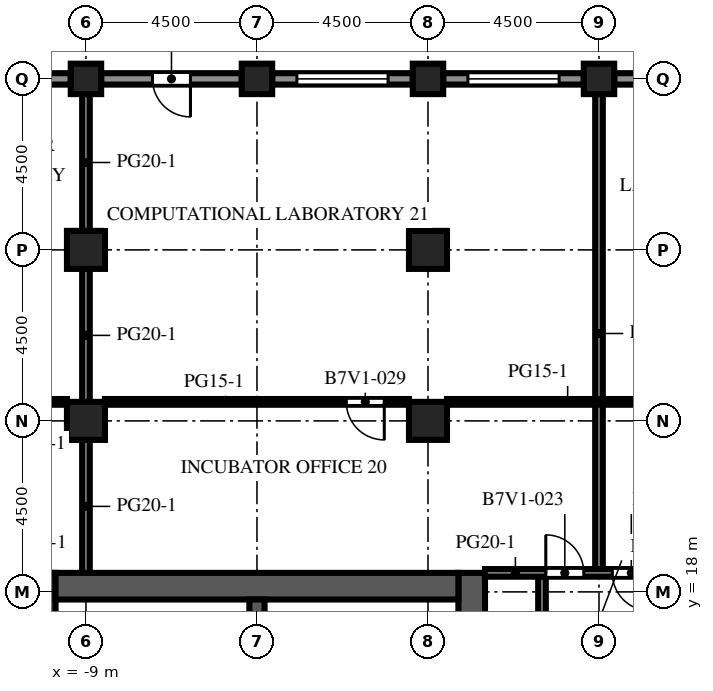
"""IFC4 building model, lengths in metres.
Left out: names, types, materials, properties, quantities, classifications, styles, units other than length and angle.
Written with IfcOpenShell. Run it as: python <this file> out.ifc"""

import sys

from ifc_helpers import new_model, si_unit, direction, frame, frame_2d, origin, origin_2d, place, context, subcontext, project, spatial, rectangle, extrude, element, fill, save


model = new_model("IFC4")
c1 = context("Model", 3, precision=1e-05, world=origin(), true_north=direction((0.0, 1.0)))
c2 = subcontext(c1, "Body", "Model", "MODEL_VIEW")
j1 = project(units=[si_unit("LENGTHUNIT", "METRE"), si_unit("PLANEANGLEUNIT", "RADIAN")], contexts=[c1])
p1 = place(None, origin())
s1 = spatial("IfcSite", under=j1, at=p1, CompositionType="ELEMENT")
p2 = place(p1, origin())
s2 = spatial("IfcBuilding", under=s1, at=p2, CompositionType="ELEMENT")
p3 = place(p2, frame((0.0, 0.0, 243.9)))
s3 = spatial("IfcBuildingStorey", under=s2, at=p3, CompositionType="ELEMENT", Elevation=243.9)
for number, where, z_axis, x_axis in (
    (1, (-9.0, 31.5, 0.0), (0.0, 0.0, 1.0), (1.0, 0.0, 0.0)),
    (2, (-4.5, 31.5, 0.0), (0.0, 0.0, 1.0), (1.0, 0.0, 0.0)),
    (3, (0.0, 31.5, 0.0), (0.0, 0.0, 1.0), (1.0, 0.0, 0.0)),
    (4, (4.5, 31.5, 0.0), (0.0, 0.0, 1.0), (1.0, 0.0, 0.0)),
):
    element("IfcColumn", number, at=place(p3, frame(where, z_axis=z_axis, x_axis=x_axis)), inside=s3, PredefinedType="COLUMN", context=c2, shape_type="SweptSolid", body=[
        extrude(rectangle(XDim=0.8, YDim=0.8, at=origin_2d()), origin(), (0.0, 0.0, 1.0), 4.1),
    ])
for number, where, z_axis, x_axis in (
    (5, (-9.0, 22.5, 0.0), (0.0, 0.0, 1.0), (1.0, 0.0, 0.0)),
    (6, (-9.0, 27.0, 0.0), (0.0, 0.0, 1.0), (1.0, 0.0, 0.0)),
    (7, (0.0, 22.5, 0.0), (0.0, 0.0, 1.0), (1.0, 0.0, 0.0)),
    (8, (0.0, 27.0, 0.0), (0.0, 0.0, 1.0), (1.0, 0.0, 0.0)),
):
    element("IfcColumn", number, at=place(p3, frame(where, z_axis=z_axis, x_axis=x_axis)), inside=s3, PredefinedType="COLUMN", context=c2, shape_type="SweptSolid", body=[
        extrude(rectangle(XDim=1.0, YDim=1.0, at=origin_2d()), origin(), (0.0, 0.0, 1.0), 4.1),
    ])
p4 = place(p3, frame((-10.15, -9.0, 0.0), z_axis=(0.0, 0.0, 1.0), x_axis=(0.0, 1.0, 0.0)))
e9 = element("IfcWall", 9, at=p4, inside=s3, PredefinedType="SHEAR", context=c2, shape_type="SweptSolid", body=[
    extrude(rectangle(XDim=27.5, YDim=0.7, at=frame_2d((13.75, 0.0))), origin(), (0.0, 0.0, 1.0), 4.1),
])
p5 = place(p4, frame((12.55, 0.0, 0.0)))
e10 = element("IfcOpeningElement", 10, at=p5, cuts=e9, PredefinedType="OPENING", context=c2, shape_type="SweptSolid", body=[
    extrude(rectangle(XDim=2.4, YDim=2.4, at=frame_2d((1.2, 1.2))), frame((0.0, 0.36, 0.0), z_axis=(0.0, -1.0, 0.0), x_axis=(1.0, 0.0, 0.0)), (0.0, 0.0, 1.0), 0.72),
])
p6 = place(p4, frame((6.825, 0.0, 0.0)))
e11 = element("IfcOpeningElement", 11, at=p6, cuts=e9, PredefinedType="OPENING", context=c2, shape_type="SweptSolid", body=[
    extrude(rectangle(XDim=1.2, YDim=2.1, at=frame_2d((0.6, 1.05))), frame((0.0, 0.36, 0.0), z_axis=(0.0, -1.0, 0.0), x_axis=(1.0, 0.0, 0.0)), (0.0, 0.0, 1.0), 0.72),
])
p7 = place(p4, frame((19.475, 0.0, 0.0)))
e12 = element("IfcOpeningElement", 12, at=p7, cuts=e9, PredefinedType="OPENING", context=c2, shape_type="SweptSolid", body=[
    extrude(rectangle(XDim=1.2, YDim=2.1, at=frame_2d((0.6, 1.05))), frame((0.0, 0.36, 0.0), z_axis=(0.0, -1.0, 0.0), x_axis=(1.0, 0.0, 0.0)), (0.0, 0.0, 1.0), 0.72),
])
p8 = place(p3, frame((1.15, -9.0, 0.0), z_axis=(0.0, 0.0, 1.0), x_axis=(0.0, 1.0, 0.0)))
e13 = element("IfcWall", 13, at=p8, inside=s3, PredefinedType="SHEAR", context=c2, shape_type="SweptSolid", body=[
    extrude(rectangle(XDim=27.5, YDim=0.7, at=frame_2d((13.75, 0.0))), origin(), (0.0, 0.0, 1.0), 4.1),
])
p9 = place(p8, frame((12.55, 0.0, 0.0)))
e14 = element("IfcOpeningElement", 14, at=p9, cuts=e13, PredefinedType="OPENING", context=c2, shape_type="SweptSolid", body=[
    extrude(rectangle(XDim=2.4, YDim=2.4, at=frame_2d((1.2, 1.2))), frame((0.0, 0.36, 0.0), z_axis=(0.0, -1.0, 0.0), x_axis=(1.0, 0.0, 0.0)), (0.0, 0.0, 1.0), 0.72),
])
p10 = place(p8, frame((3.9, 0.0, 0.0)))
e15 = element("IfcOpeningElement", 15, at=p10, cuts=e13, PredefinedType="OPENING", context=c2, shape_type="SweptSolid", body=[
    extrude(rectangle(XDim=1.2, YDim=2.1, at=frame_2d((0.6, 1.05))), frame((0.0, 0.36, 0.0), z_axis=(0.0, -1.0, 0.0), x_axis=(1.0, 0.0, 0.0)), (0.0, 0.0, 1.0), 0.72),
])
p11 = place(p8, frame((22.4, 0.0, 0.0)))
e16 = element("IfcOpeningElement", 16, at=p11, cuts=e13, PredefinedType="OPENING", context=c2, shape_type="SweptSolid", body=[
    extrude(rectangle(XDim=1.2, YDim=2.1, at=frame_2d((0.6, 1.05))), frame((0.0, 0.36, 0.0), z_axis=(0.0, -1.0, 0.0), x_axis=(1.0, 0.0, 0.0)), (0.0, 0.0, 1.0), 0.72),
])
p12 = place(p3, frame((-9.8, 18.15, 0.0), z_axis=(0.0, 0.0, 1.0), x_axis=(1.0, 0.0, 0.0)))
e17 = element("IfcWall", 17, at=p12, inside=s3, PredefinedType="SHEAR", context=c2, shape_type="SweptSolid", body=[
    extrude(rectangle(XDim=10.6, YDim=0.7, at=frame_2d((5.3, 0.0))), origin(), (0.0, 0.0, 1.0), 4.1),
])
p13 = place(p3, frame((-4.5, 10.2, 0.0), z_axis=(0.0, 0.0, 1.0), x_axis=(0.0, 1.0, 0.0)))
e18 = element("IfcWall", 18, at=p13, inside=s3, PredefinedType="SHEAR", context=c2, shape_type="SweptSolid", body=[
    extrude(rectangle(XDim=7.6, YDim=0.4, at=frame_2d((3.8, 0.0))), origin(), (0.0, 0.0, 1.0), 4.1),
])
p14 = place(p3, frame((4.9, 31.5, 0.0), z_axis=(0.0, 0.0, 1.0), x_axis=(1.0, 0.0, 0.0)))
e19 = element("IfcWall", 19, at=p14, inside=s3, PredefinedType="SOLIDWALL", context=c2, shape_type="SweptSolid", body=[
    extrude(rectangle(XDim=3.7, YDim=0.3, at=frame_2d((1.85, 0.0))), origin(), (0.0, 0.0, 1.0), 2.85),
])
p15 = place(p14, frame((0.65, 0.0, 0.8)))
e20 = element("IfcOpeningElement", 20, at=p15, cuts=e19, PredefinedType="OPENING", context=c2, shape_type="SweptSolid", body=[
    extrude(rectangle(XDim=2.4, YDim=1.7, at=frame_2d((1.2, 0.85))), frame((0.0, 0.16, 0.0), z_axis=(0.0, -1.0, 0.0), x_axis=(1.0, 0.0, 0.0)), (0.0, 0.0, 1.0), 0.32),
])
p16 = place(p3, frame((0.4, 31.5, 0.0), z_axis=(0.0, 0.0, 1.0), x_axis=(1.0, 0.0, 0.0)))
e21 = element("IfcWall", 21, at=p16, inside=s3, PredefinedType="SOLIDWALL", context=c2, shape_type="SweptSolid", body=[
    extrude(rectangle(XDim=3.7, YDim=0.3, at=frame_2d((1.85, 0.0))), origin(), (0.0, 0.0, 1.0), 2.85),
])
p17 = place(p16, frame((0.65, 0.0, 0.8)))
e22 = element("IfcOpeningElement", 22, at=p17, cuts=e21, PredefinedType="OPENING", context=c2, shape_type="SweptSolid", body=[
    extrude(rectangle(XDim=2.4, YDim=1.7, at=frame_2d((1.2, 0.85))), frame((0.0, 0.16, 0.0), z_axis=(0.0, -1.0, 0.0), x_axis=(1.0, 0.0, 0.0)), (0.0, 0.0, 1.0), 0.32),
])
p18 = place(p3, frame((-4.1, 31.5, 0.0), z_axis=(0.0, 0.0, 1.0), x_axis=(1.0, 0.0, 0.0)))
e23 = element("IfcWall", 23, at=p18, inside=s3, PredefinedType="SOLIDWALL", context=c2, shape_type="SweptSolid", body=[
    extrude(rectangle(XDim=3.7, YDim=0.3, at=frame_2d((1.85, 0.0))), origin(), (0.0, 0.0, 1.0), 2.85),
])
p19 = place(p18, frame((0.65, 0.0, 0.8)))
e24 = element("IfcOpeningElement", 24, at=p19, cuts=e23, PredefinedType="OPENING", context=c2, shape_type="SweptSolid", body=[
    extrude(rectangle(XDim=2.4, YDim=1.7, at=frame_2d((1.2, 0.85))), frame((0.0, 0.16, 0.0), z_axis=(0.0, -1.0, 0.0), x_axis=(1.0, 0.0, 0.0)), (0.0, 0.0, 1.0), 0.32),
])
p20 = place(p3, frame((-8.6, 31.5, 0.0), z_axis=(0.0, 0.0, 1.0), x_axis=(1.0, 0.0, 0.0)))
e25 = element("IfcWall", 25, at=p20, inside=s3, PredefinedType="SOLIDWALL", context=c2, shape_type="SweptSolid", body=[
    extrude(rectangle(XDim=3.7, YDim=0.3, at=frame_2d((1.85, 0.0))), origin(), (0.0, 0.0, 1.0), 2.85),
])
p21 = place(p20, frame((1.35, 0.0, 0.0)))
e26 = element("IfcOpeningElement", 26, at=p21, cuts=e25, PredefinedType="OPENING", context=c2, shape_type="SweptSolid", body=[
    extrude(rectangle(XDim=1.0, YDim=2.2, at=frame_2d((0.5, 1.1))), frame((0.0, 0.16, 0.0), z_axis=(0.0, -1.0, 0.0), x_axis=(1.0, 0.0, 0.0)), (0.0, 0.0, 1.0), 0.32),
])
p22 = place(p3, frame((-13.1, 31.5, 0.0), z_axis=(0.0, 0.0, 1.0), x_axis=(1.0, 0.0, 0.0)))
e27 = element("IfcWall", 27, at=p22, inside=s3, PredefinedType="SOLIDWALL", context=c2, shape_type="SweptSolid", body=[
    extrude(rectangle(XDim=3.7, YDim=0.3, at=frame_2d((1.85, 0.0))), origin(), (0.0, 0.0, 1.0), 2.85),
])
p23 = place(p22, frame((0.65, 0.0, 0.8)))
e28 = element("IfcOpeningElement", 28, at=p23, cuts=e27, PredefinedType="OPENING", context=c2, shape_type="SweptSolid", body=[
    extrude(rectangle(XDim=2.4, YDim=1.7, at=frame_2d((1.2, 0.85))), frame((0.0, 0.16, 0.0), z_axis=(0.0, -1.0, 0.0), x_axis=(1.0, 0.0, 0.0)), (0.0, 0.0, 1.0), 0.32),
])
p24 = place(p3, frame((-0.6, 14.912, 0.0), z_axis=(0.0, 0.0, 1.0), x_axis=(0.0, 1.0, 0.0)))
e29 = element("IfcWall", 29, at=p24, inside=s3, PredefinedType="PARTITIONING", context=c2, shape_type="SweptSolid", body=[
    extrude(rectangle(XDim=2.888, YDim=0.1, at=frame_2d((1.444, 0.0))), origin(), (0.0, 0.0, 1.0), 3.65),
])
p25 = place(p24, frame((0.944, 0.0, 0.0)))
e30 = element("IfcOpeningElement", 30, at=p25, cuts=e29, PredefinedType="OPENING", context=c2, shape_type="SweptSolid", body=[
    extrude(rectangle(XDim=1.0, YDim=2.1, at=frame_2d((0.5, 1.05))), frame((0.0, 0.06, 0.0), z_axis=(0.0, -1.0, 0.0), x_axis=(1.0, 0.0, 0.0)), (0.0, 0.0, 1.0), 0.12),
])
for number, where, z_axis, x_axis in (
    (31, (-9.0, 18.5, 0.0), (0.0, 0.0, 1.0), (0.0, 1.0, 0.0)),
    (32, (-9.0, 23.0, 0.0), (0.0, 0.0, 1.0), (0.0, 1.0, 0.0)),
):
    element("IfcWall", number, at=place(p3, frame(where, z_axis=z_axis, x_axis=x_axis)), inside=s3, PredefinedType="PARTITIONING", context=c2, shape_type="SweptSolid", body=[
        extrude(rectangle(XDim=3.5, YDim=0.2, at=frame_2d((1.75, 0.0))), origin(), (0.0, 0.0, 1.0), 3.65),
    ])
p26 = place(p3, frame((-9.0, 27.5, 0.0), z_axis=(0.0, 0.0, 1.0), x_axis=(0.0, 1.0, 0.0)))
e33 = element("IfcWall", 33, at=p26, inside=s3, PredefinedType="PARTITIONING", context=c2, shape_type="SweptSolid", body=[
    extrude(rectangle(XDim=3.6, YDim=0.2, at=frame_2d((1.8, 0.0))), origin(), (0.0, 0.0, 1.0), 3.65),
])
p27 = place(p3, frame((3.0, 6.7, 0.0), z_axis=(0.0, 0.0, 1.0), x_axis=(0.0, 1.0, 0.0)))
e34 = element("IfcWall", 34, at=p27, inside=s3, PredefinedType="PARTITIONING", context=c2, shape_type="SweptSolid", body=[
    extrude(rectangle(XDim=11.8, YDim=0.2, at=frame_2d((5.9, 0.0))), origin(), (0.0, 0.0, 1.0), 3.65),
])
p28 = place(p27, frame((6.1, 0.0, 0.0)))
e35 = element("IfcOpeningElement", 35, at=p28, cuts=e34, PredefinedType="OPENING", context=c2, shape_type="SweptSolid", body=[
    extrude(rectangle(XDim=1.0, YDim=2.1, at=frame_2d((0.5, 1.05))), frame((0.0, 0.11, 0.0), z_axis=(0.0, -1.0, 0.0), x_axis=(1.0, 0.0, 0.0)), (0.0, 0.0, 1.0), 0.22),
])
p29 = place(p3, frame((4.5, 18.5, 0.0), z_axis=(0.0, 0.0, 1.0), x_axis=(0.0, 1.0, 0.0)))
e36 = element("IfcWall", 36, at=p29, inside=s3, PredefinedType="PARTITIONING", context=c2, shape_type="SweptSolid", body=[
    extrude(rectangle(XDim=12.6, YDim=0.2, at=frame_2d((6.3, 0.0))), origin(), (0.0, 0.0, 1.0), 3.65),
])
p30 = place(p3, frame((1.5, 18.5, 0.0), z_axis=(0.0, 0.0, 1.0), x_axis=(1.0, 0.0, 0.0)))
e37 = element("IfcWall", 37, at=p30, inside=s3, PredefinedType="PARTITIONING", context=c2, shape_type="SweptSolid", body=[
    extrude(rectangle(XDim=4.5, YDim=0.2, at=frame_2d((2.25, 0.0))), origin(), (0.0, 0.0, 1.0), 3.65),
])
p31 = place(p30, frame((1.6, 0.0, 0.0)))
e38 = element("IfcOpeningElement", 38, at=p31, cuts=e37, PredefinedType="OPENING", context=c2, shape_type="SweptSolid", body=[
    extrude(rectangle(XDim=1.0, YDim=2.1, at=frame_2d((0.5, 1.05))), frame((0.0, 0.11, 0.0), z_axis=(0.0, -1.0, 0.0), x_axis=(1.0, 0.0, 0.0)), (0.0, 0.0, 1.0), 0.22),
])
p32 = place(p30, frame((3.35, 0.0, 0.0)))
e39 = element("IfcOpeningElement", 39, at=p32, cuts=e37, PredefinedType="OPENING", context=c2, shape_type="SweptSolid", body=[
    extrude(rectangle(XDim=1.0, YDim=2.1, at=frame_2d((0.5, 1.05))), frame((0.0, 0.11, 0.0), z_axis=(0.0, -1.0, 0.0), x_axis=(1.0, 0.0, 0.0)), (0.0, 0.0, 1.0), 0.22),
])
p33 = place(p3, frame((-13.5, 23.0, 0.0), z_axis=(0.0, 0.0, 1.0), x_axis=(1.0, 0.0, 0.0)))
e40 = element("IfcWall", 40, at=p33, inside=s3, PredefinedType="PARTITIONING", context=c2, shape_type="SweptSolid", body=[
    extrude(rectangle(XDim=4.0, YDim=0.15, at=frame_2d((2.0, 0.0))), origin(), (0.0, 0.0, 1.0), 3.65),
])
p34 = place(p33, frame((1.35, 0.0, 0.0)))
e41 = element("IfcOpeningElement", 41, at=p34, cuts=e40, PredefinedType="OPENING", context=c2, shape_type="SweptSolid", body=[
    extrude(rectangle(XDim=1.0, YDim=2.1, at=frame_2d((0.5, 1.05))), frame((0.0, 0.085, 0.0), z_axis=(0.0, -1.0, 0.0), x_axis=(1.0, 0.0, 0.0)), (0.0, 0.0, 1.0), 0.17),
])
p35 = place(p3, frame((-8.5, 23.0, 0.0), z_axis=(0.0, 0.0, 1.0), x_axis=(1.0, 0.0, 0.0)))
e42 = element("IfcWall", 42, at=p35, inside=s3, PredefinedType="PARTITIONING", context=c2, shape_type="SweptSolid", body=[
    extrude(rectangle(XDim=8.0, YDim=0.15, at=frame_2d((4.0, 0.0))), origin(), (0.0, 0.0, 1.0), 3.65),
])
p36 = place(p35, frame((6.35, 0.0, 0.0)))
e43 = element("IfcOpeningElement", 43, at=p36, cuts=e42, PredefinedType="OPENING", context=c2, shape_type="SweptSolid", body=[
    extrude(rectangle(XDim=1.0, YDim=2.1, at=frame_2d((0.5, 1.05))), frame((0.0, 0.085, 0.0), z_axis=(0.0, -1.0, 0.0), x_axis=(1.0, 0.0, 0.0)), (0.0, 0.0, 1.0), 0.17),
])
p37 = place(p3, frame((0.5, 23.0, 0.0), z_axis=(0.0, 0.0, 1.0), x_axis=(1.0, 0.0, 0.0)))
e44 = element("IfcWall", 44, at=p37, inside=s3, PredefinedType="PARTITIONING", context=c2, shape_type="SweptSolid", body=[
    extrude(rectangle(XDim=8.0, YDim=0.15, at=frame_2d((4.0, 0.0))), origin(), (0.0, 0.0, 1.0), 3.65),
])
p38 = place(p37, frame((6.35, 0.0, 0.0)))
e45 = element("IfcOpeningElement", 45, at=p38, cuts=e44, PredefinedType="OPENING", context=c2, shape_type="SweptSolid", body=[
    extrude(rectangle(XDim=1.0, YDim=2.1, at=frame_2d((0.5, 1.05))), frame((0.0, 0.085, 0.0), z_axis=(0.0, -1.0, 0.0), x_axis=(1.0, 0.0, 0.0)), (0.0, 0.0, 1.0), 0.17),
])
p39 = place(p17, origin())
e46 = element("IfcWindow", 46, at=p39, inside=s3, PartitioningType="SINGLE_PANEL", PredefinedType="WINDOW", context=c2, shape_type="SweptSolid", body=[
    extrude(rectangle(XDim=2.4, YDim=1.7, at=frame_2d((1.2, 0.85))), frame((0.0, 0.03, 0.0), z_axis=(0.0, -1.0, 0.0), x_axis=(1.0, 0.0, 0.0)), (0.0, 0.0, 1.0), 0.06),
])
fill(e22, e46)
p40 = place(p19, origin())
e47 = element("IfcWindow", 47, at=p40, inside=s3, PartitioningType="SINGLE_PANEL", PredefinedType="WINDOW", context=c2, shape_type="SweptSolid", body=[
    extrude(rectangle(XDim=2.4, YDim=1.7, at=frame_2d((1.2, 0.85))), frame((0.0, 0.03, 0.0), z_axis=(0.0, -1.0, 0.0), x_axis=(1.0, 0.0, 0.0)), (0.0, 0.0, 1.0), 0.06),
])
fill(e24, e47)
p41 = place(p21, origin())
e48 = element("IfcDoor", 48, at=p41, inside=s3, OperationType="SINGLE_SWING_RIGHT", PredefinedType="DOOR", context=c2, shape_type="SweptSolid", body=[
    extrude(rectangle(XDim=1.0, YDim=2.2, at=frame_2d((0.5, 1.1))), frame((0.0, 0.025, 0.0), z_axis=(0.0, -1.0, 0.0), x_axis=(1.0, 0.0, 0.0)), (0.0, 0.0, 1.0), 0.05),
])
fill(e26, e48)
p42 = place(p31, origin())
e49 = element("IfcDoor", 49, at=p42, inside=s3, OperationType="SINGLE_SWING_LEFT", PredefinedType="DOOR", context=c2, shape_type="SweptSolid", body=[
    extrude(rectangle(XDim=1.0, YDim=2.1, at=frame_2d((0.5, 1.05))), frame((0.0, 0.025, 0.0), z_axis=(0.0, -1.0, 0.0), x_axis=(1.0, 0.0, 0.0)), (0.0, 0.0, 1.0), 0.05),
])
fill(e38, e49)
p43 = place(p32, origin())
e50 = element("IfcDoor", 50, at=p43, inside=s3, OperationType="SINGLE_SWING_RIGHT", PredefinedType="DOOR", context=c2, shape_type="SweptSolid", body=[
    extrude(rectangle(XDim=1.0, YDim=2.1, at=frame_2d((0.5, 1.05))), frame((0.0, 0.025, 0.0), z_axis=(0.0, -1.0, 0.0), x_axis=(1.0, 0.0, 0.0)), (0.0, 0.0, 1.0), 0.05),
])
fill(e39, e50)
p44 = place(p36, origin())
e51 = element("IfcDoor", 51, at=p44, inside=s3, OperationType="SINGLE_SWING_RIGHT", PredefinedType="DOOR", context=c2, shape_type="SweptSolid", body=[
    extrude(rectangle(XDim=1.0, YDim=2.1, at=frame_2d((0.5, 1.05))), frame((0.0, 0.025, 0.0), z_axis=(0.0, -1.0, 0.0), x_axis=(1.0, 0.0, 0.0)), (0.0, 0.0, 1.0), 0.05),
])
fill(e43, e51)
save(model, sys.argv[1])
